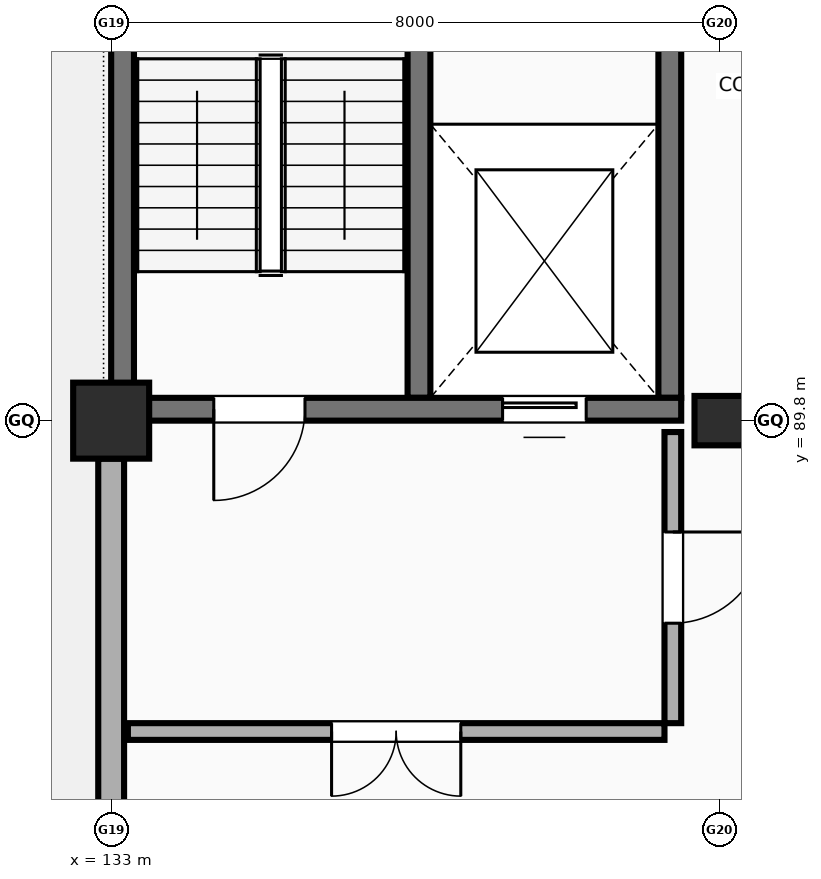
"""IFC4 building model, lengths in metres.
Left out: names, types, materials, properties, quantities, classifications, styles, units other than length and angle.
Written with IfcOpenShell. Run it as: python <this file> out.ifc"""

import sys

from ifc_helpers import new_model, si_unit, direction, frame, frame_2d, origin, origin_2d, place, context, subcontext, project, spatial, rectangle, extrude, element, fill, save


model = new_model("IFC4")
c1 = context("Model", 3, precision=1e-05, world=origin(), true_north=direction((0.0, 1.0)))
c2 = subcontext(c1, "Body", "Model", "MODEL_VIEW")
j1 = project(units=[si_unit("LENGTHUNIT", "METRE"), si_unit("PLANEANGLEUNIT", "RADIAN")], contexts=[c1])
p1 = place(None, origin())
s1 = spatial("IfcSite", under=j1, at=p1, CompositionType="ELEMENT")
p2 = place(p1, origin())
s2 = spatial("IfcBuilding", under=s1, at=p2, CompositionType="ELEMENT")
p3 = place(p2, frame((0.0, 0.0, 14.2)))
s3 = spatial("IfcBuildingStorey", under=s2, at=p3, CompositionType="ELEMENT", Elevation=14.2)
p4 = place(p3, frame((133.0, 89.8, 0.0), z_axis=(0.0, 0.0, 1.0), x_axis=(1.0, 0.0, 0.0)))
e1 = element("IfcColumn", 1, at=p4, inside=s3, PredefinedType="COLUMN", context=c2, shape_type="SweptSolid", body=[
    extrude(rectangle(XDim=1.0, YDim=1.0, at=origin_2d()), origin(), (0.0, 0.0, 1.0), 3.8),
])
p5 = place(p3, frame((141.0, 89.8, 0.0), z_axis=(0.0, 0.0, 1.0), x_axis=(1.0, 0.0, 0.0)))
e2 = element("IfcColumn", 2, at=p5, inside=s3, PredefinedType="COLUMN", context=c2, shape_type="SweptSolid", body=[
    extrude(rectangle(XDim=0.65, YDim=0.65, at=origin_2d()), origin(), (0.0, 0.0, 1.0), 3.8),
])
for number, where, z_axis, x_axis in (
    (3, (133.15, 90.1, 0.0), (0.0, 0.0, 1.0), (0.0, 1.0, 0.0)),
    (4, (140.35, 90.1, 0.0), (0.0, 0.0, 1.0), (0.0, 1.0, 0.0)),
    (5, (137.05, 90.1, 0.0), (0.0, 0.0, 1.0), (0.0, 1.0, 0.0)),
):
    element("IfcWall", number, at=place(p3, frame(where, z_axis=z_axis, x_axis=x_axis)), inside=s3, PredefinedType="SHEAR", context=c2, shape_type="SweptSolid", body=[
        extrude(rectangle(XDim=8.2, YDim=0.3, at=frame_2d((4.1, 0.0))), origin(), (0.0, 0.0, 1.0), 3.8),
    ])
p6 = place(p3, frame((133.0, 81.7, 0.0), z_axis=(0.0, 0.0, 1.0), x_axis=(0.0, 1.0, 0.0)))
e6 = element("IfcWall", 6, at=p6, inside=s3, PredefinedType="SOLIDWALL", context=c2, shape_type="SweptSolid", body=[
    extrude(rectangle(XDim=7.6, YDim=0.34, at=frame_2d((3.8, 0.0))), origin(), (0.0, 0.0, 1.0), 2.35),
])
p7 = place(p3, frame((133.0, 89.95, 0.0), z_axis=(0.0, 0.0, 1.0), x_axis=(1.0, 0.0, 0.0)))
e7 = element("IfcWall", 7, at=p7, inside=s3, PredefinedType="SHEAR", context=c2, shape_type="SweptSolid", body=[
    extrude(rectangle(XDim=7.5, YDim=0.3, at=frame_2d((3.75, 0.0))), origin(), (0.0, 0.0, 1.0), 3.8),
])
p8 = place(p7, frame((2.55, 0.0, 0.0), z_axis=(0.0, 0.0, 1.0), x_axis=(-1.0, 0.0, 0.0)))
e8 = element("IfcOpeningElement", 8, at=p8, cuts=e7, PredefinedType="OPENING", context=c2, shape_type="SweptSolid", body=[
    extrude(rectangle(XDim=1.2, YDim=2.15, at=frame_2d((0.6, 1.075))), frame((0.0, 0.16, 0.0), z_axis=(0.0, -1.0, 0.0), x_axis=(1.0, 0.0, 0.0)), (0.0, 0.0, 1.0), 0.32),
])
p9 = place(p7, frame((5.15, 0.0, 0.0)))
e9 = element("IfcOpeningElement", 9, at=p9, cuts=e7, PredefinedType="OPENING", context=c2, shape_type="SweptSolid", body=[
    extrude(rectangle(XDim=1.1, YDim=2.15, at=frame_2d((0.55, 1.075))), frame((0.0, 0.16, 0.0), z_axis=(0.0, -1.0, 0.0), x_axis=(1.0, 0.0, 0.0)), (0.0, 0.0, 1.0), 0.32),
])
p10 = place(p3, frame((133.22, 85.71, 0.0), z_axis=(0.0, 0.0, 1.0), x_axis=(1.0, 0.0, 0.0)))
e10 = element("IfcWall", 10, at=p10, inside=s3, PredefinedType="SOLIDWALL", context=c2, shape_type="SweptSolid", body=[
    extrude(rectangle(XDim=7.06, YDim=0.22, at=frame_2d((3.53, 0.0))), origin(), (0.0, 0.0, 1.0), 2.7),
])
p11 = place(p10, frame((4.38, 0.0, 0.0), z_axis=(0.0, 0.0, 1.0), x_axis=(-1.0, 0.0, 0.0)))
e11 = element("IfcOpeningElement", 11, at=p11, cuts=e10, PredefinedType="OPENING", context=c2, shape_type="SweptSolid", body=[
    extrude(rectangle(XDim=1.7, YDim=2.18, at=frame_2d((0.85, 1.09))), frame((0.0, 0.12, 0.0), z_axis=(0.0, -1.0, 0.0), x_axis=(1.0, 0.0, 0.0)), (0.0, 0.0, 1.0), 0.24),
])
p12 = place(p3, frame((140.39, 85.82, 0.0), z_axis=(0.0, 0.0, 1.0), x_axis=(0.0, 1.0, 0.0)))
e12 = element("IfcWall", 12, at=p12, inside=s3, PredefinedType="SOLIDWALL", context=c2, shape_type="SweptSolid", body=[
    extrude(rectangle(XDim=3.83, YDim=0.22, at=frame_2d((1.915, 0.0))), origin(), (0.0, 0.0, 1.0), 2.7),
])
p13 = place(p12, frame((2.515, 0.0, 0.0), z_axis=(0.0, 0.0, 1.0), x_axis=(-1.0, 0.0, 0.0)))
e13 = element("IfcOpeningElement", 13, at=p13, cuts=e12, PredefinedType="OPENING", context=c2, shape_type="SweptSolid", body=[
    extrude(rectangle(XDim=1.2, YDim=2.15, at=frame_2d((0.6, 1.075))), frame((0.0, 0.12, 0.0), z_axis=(0.0, -1.0, 0.0), x_axis=(1.0, 0.0, 0.0)), (0.0, 0.0, 1.0), 0.24),
])
p14 = place(p8, origin())
e14 = element("IfcDoor", 14, at=p14, inside=s3, OperationType="SINGLE_SWING_RIGHT", PredefinedType="DOOR", context=c2, shape_type="SweptSolid", body=[
    extrude(rectangle(XDim=1.2, YDim=2.15, at=frame_2d((0.6, 1.075))), frame((0.0, 0.025, 0.0), z_axis=(0.0, -1.0, 0.0), x_axis=(1.0, 0.0, 0.0)), (0.0, 0.0, 1.0), 0.05),
])
fill(e8, e14)
p15 = place(p9, origin())
e15 = element("IfcDoor", 15, at=p15, inside=s3, OperationType="SLIDING_TO_LEFT", PredefinedType="DOOR", context=c2, shape_type="SweptSolid", body=[
    extrude(rectangle(XDim=1.1, YDim=2.15, at=frame_2d((0.55, 1.075))), frame((0.0, 0.025, 0.0), z_axis=(0.0, -1.0, 0.0), x_axis=(1.0, 0.0, 0.0)), (0.0, 0.0, 1.0), 0.05),
])
fill(e9, e15)
p16 = place(p11, origin())
e16 = element("IfcDoor", 16, at=p16, inside=s3, OperationType="DOUBLE_DOOR_SINGLE_SWING", PredefinedType="DOOR", context=c2, shape_type="SweptSolid", body=[
    extrude(rectangle(XDim=1.7, YDim=2.18, at=frame_2d((0.85, 1.09))), frame((0.0, 0.025, 0.0), z_axis=(0.0, -1.0, 0.0), x_axis=(1.0, 0.0, 0.0)), (0.0, 0.0, 1.0), 0.05),
])
fill(e11, e16)
p17 = place(p13, origin())
e17 = element("IfcDoor", 17, at=p17, inside=s3, OperationType="SINGLE_SWING_LEFT", PredefinedType="DOOR", context=c2, shape_type="SweptSolid", body=[
    extrude(rectangle(XDim=1.2, YDim=2.15, at=frame_2d((0.6, 1.075))), frame((0.0, 0.025, 0.0), z_axis=(0.0, -1.0, 0.0), x_axis=(1.0, 0.0, 0.0)), (0.0, 0.0, 1.0), 0.05),
])
fill(e13, e17)
save(model, sys.argv[1])
